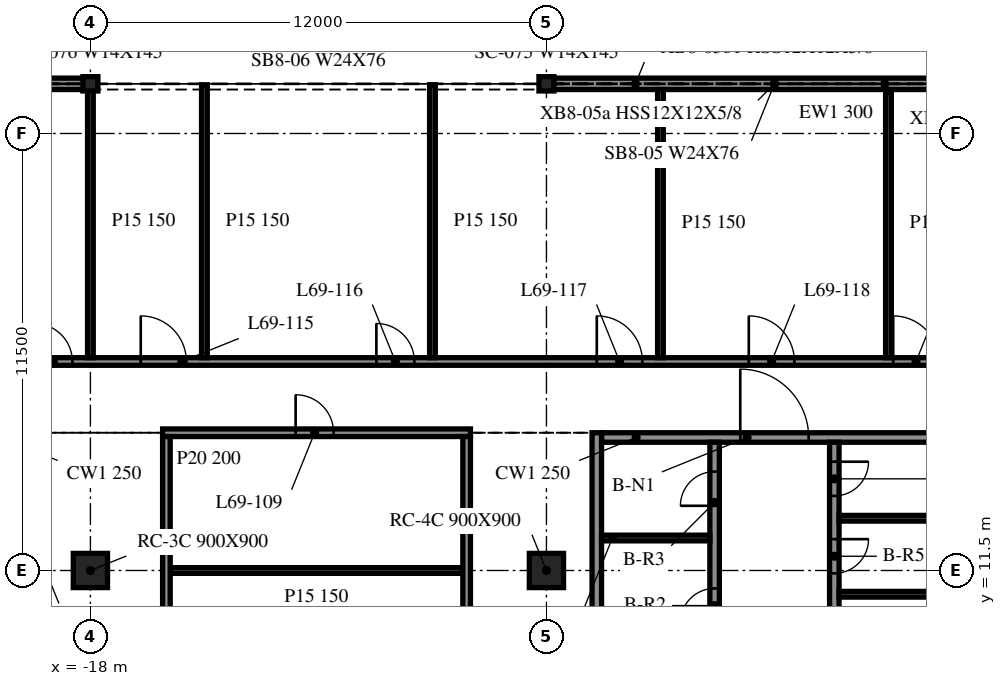
"""IFC4 building model, lengths in metres.
Left out: names, types, materials, properties, quantities, classifications, styles, units other than length and angle.
Written with IfcOpenShell. Run it as: python <this file> out.ifc"""

import sys

from ifc_helpers import new_model, si_unit, direction, frame, frame_2d, origin, origin_2d, place, context, subcontext, project, spatial, rectangle, i_section, extrude, element, fill, save


model = new_model("IFC4")
c1 = context("Model", 3, precision=1e-05, world=origin(), true_north=direction((0.0, 1.0)))
c2 = subcontext(c1, "Body", "Model", "MODEL_VIEW")
j1 = project(units=[si_unit("LENGTHUNIT", "METRE"), si_unit("PLANEANGLEUNIT", "RADIAN")], contexts=[c1])
p1 = place(None, origin())
s1 = spatial("IfcSite", under=j1, at=p1, CompositionType="ELEMENT")
p2 = place(p1, origin())
s2 = spatial("IfcBuilding", under=s1, at=p2, CompositionType="ELEMENT")
p3 = place(p2, frame((0.0, 0.0, 282.3)))
s3 = spatial("IfcBuildingStorey", under=s2, at=p3, CompositionType="ELEMENT", Elevation=282.3)
for number, where, z_axis, x_axis in (
    (1, (-18.0, 11.5, -0.34), (0.0, 0.0, 1.0), (1.0, 0.0, 0.0)),
    (2, (-6.0, 11.5, -0.34), (0.0, 0.0, 1.0), (1.0, 0.0, 0.0)),
):
    element("IfcColumn", number, at=place(p3, frame(where, z_axis=z_axis, x_axis=x_axis)), inside=s3, PredefinedType="COLUMN", context=c2, shape_type="SweptSolid", body=[
        extrude(rectangle(XDim=0.9, YDim=0.9, at=origin_2d()), origin(), (0.0, 0.0, 1.0), 7.34),
    ])
for number, where, z_axis, x_axis in (
    (3, (-6.0, 24.307, -0.34), (0.0, 0.0, 1.0), (1.0, 0.0, 0.0)),
    (4, (-18.0, 24.307, -0.34), (0.0, 0.0, 1.0), (1.0, 0.0, 0.0)),
):
    element("IfcColumn", number, at=place(p3, frame(where, z_axis=z_axis, x_axis=x_axis)), inside=s3, PredefinedType="COLUMN", context=c2, shape_type="SweptSolid", body=[
        extrude(i_section(OverallWidth=0.394, OverallDepth=0.376, WebThickness=0.017, FlangeThickness=0.028, at=origin_2d()), origin(), (0.0, 0.0, 1.0), 3.8),
    ])
for number, where, z_axis, x_axis in (
    (5, (5.991, 24.307, 0.0), (0.0, 0.0, 1.0), (-1.0, 0.0, 0.0)),
    (6, (-18.009, 24.307, 0.0), (0.0, 0.0, 1.0), (-1.0, 0.0, 0.0)),
):
    element("IfcWall", number, at=place(p3, frame(where, z_axis=z_axis, x_axis=x_axis)), inside=s3, PredefinedType="NOTDEFINED", context=c2, shape_type="SweptSolid", body=[
        extrude(rectangle(XDim=11.983, YDim=0.3, at=frame_2d((5.991, 0.0))), origin(), (0.0, 0.0, 1.0), 3.46),
    ])
p4 = place(p3, frame((-4.675, 15.125, 0.0), z_axis=(0.0, 0.0, 1.0), x_axis=(0.0, -1.0, 0.0)))
e7 = element("IfcWall", 7, at=p4, inside=s3, PredefinedType="SOLIDWALL", context=c2, shape_type="SweptSolid", body=[
    extrude(rectangle(XDim=24.25, YDim=0.25, at=frame_2d((12.125, 0.0))), origin(), (0.0, 0.0, 1.0), 3.46),
])
p5 = place(p3, frame((-4.55, 15.0, 0.0), z_axis=(0.0, 0.0, 1.0), x_axis=(1.0, 0.0, 0.0)))
e8 = element("IfcWall", 8, at=p5, inside=s3, PredefinedType="SOLIDWALL", context=c2, shape_type="SweptSolid", body=[
    extrude(rectangle(XDim=9.1, YDim=0.25, at=frame_2d((4.55, 0.0))), origin(), (0.0, 0.0, 1.0), 3.46),
])
p6 = place(p5, frame((3.65, 0.0, 0.0)))
e9 = element("IfcOpeningElement", 9, at=p6, cuts=e8, PredefinedType="OPENING", context=c2, shape_type="SweptSolid", body=[
    extrude(rectangle(XDim=1.8, YDim=2.1, at=frame_2d((0.9, 1.05))), frame((0.0, 0.135, 0.0), z_axis=(0.0, -1.0, 0.0), x_axis=(1.0, 0.0, 0.0)), (0.0, 0.0, 1.0), 0.27),
])
p7 = place(p3, frame((-1.575, -8.875, 0.0), z_axis=(0.0, 0.0, 1.0), x_axis=(0.0, 1.0, 0.0)))
e10 = element("IfcWall", 10, at=p7, inside=s3, PredefinedType="SOLIDWALL", context=c2, shape_type="SweptSolid", body=[
    extrude(rectangle(XDim=23.75, YDim=0.25, at=frame_2d((11.875, 0.0))), origin(), (0.0, 0.0, 1.0), 3.46),
])
p8 = place(p7, frame((7.2, 0.0, 0.0)))
e11 = element("IfcOpeningElement", 11, at=p8, cuts=e10, PredefinedType="OPENING", context=c2, shape_type="SweptSolid", body=[
    extrude(rectangle(XDim=1.1, YDim=2.1, at=frame_2d((0.55, 1.05))), frame((0.0, 0.135, 0.0), z_axis=(0.0, -1.0, 0.0), x_axis=(1.0, 0.0, 0.0)), (0.0, 0.0, 1.0), 0.27),
])
p9 = place(p7, frame((9.95, 0.0, 0.0)))
e12 = element("IfcOpeningElement", 12, at=p9, cuts=e10, PredefinedType="OPENING", context=c2, shape_type="SweptSolid", body=[
    extrude(rectangle(XDim=1.1, YDim=2.1, at=frame_2d((0.55, 1.05))), frame((0.0, 0.135, 0.0), z_axis=(0.0, -1.0, 0.0), x_axis=(1.0, 0.0, 0.0)), (0.0, 0.0, 1.0), 0.27),
])
p10 = place(p7, frame((12.7, 0.0, 0.0)))
e13 = element("IfcOpeningElement", 13, at=p10, cuts=e10, PredefinedType="OPENING", context=c2, shape_type="SweptSolid", body=[
    extrude(rectangle(XDim=1.1, YDim=2.1, at=frame_2d((0.55, 1.05))), frame((0.0, 0.135, 0.0), z_axis=(0.0, -1.0, 0.0), x_axis=(1.0, 0.0, 0.0)), (0.0, 0.0, 1.0), 0.27),
])
p11 = place(p7, frame((15.45, 0.0, 0.0)))
e14 = element("IfcOpeningElement", 14, at=p11, cuts=e10, PredefinedType="OPENING", context=c2, shape_type="SweptSolid", body=[
    extrude(rectangle(XDim=1.1, YDim=2.1, at=frame_2d((0.55, 1.05))), frame((0.0, 0.135, 0.0), z_axis=(0.0, -1.0, 0.0), x_axis=(1.0, 0.0, 0.0)), (0.0, 0.0, 1.0), 0.27),
])
p12 = place(p7, frame((2.55, 0.0, 0.0)))
e15 = element("IfcOpeningElement", 15, at=p12, cuts=e10, PredefinedType="OPENING", context=c2, shape_type="SweptSolid", body=[
    extrude(rectangle(XDim=0.9, YDim=2.1, at=frame_2d((0.45, 1.05))), frame((0.0, 0.135, 0.0), z_axis=(0.0, -1.0, 0.0), x_axis=(1.0, 0.0, 0.0)), (0.0, 0.0, 1.0), 0.27),
])
p13 = place(p7, frame((19.002, 0.0, 0.0)))
e16 = element("IfcOpeningElement", 16, at=p13, cuts=e10, PredefinedType="OPENING", context=c2, shape_type="SweptSolid", body=[
    extrude(rectangle(XDim=0.9, YDim=2.1, at=frame_2d((0.45, 1.05))), frame((0.0, 0.135, 0.0), z_axis=(0.0, -1.0, 0.0), x_axis=(1.0, 0.0, 0.0)), (0.0, 0.0, 1.0), 0.27),
])
p14 = place(p7, frame((22.077, 0.0, 0.0)))
e17 = element("IfcOpeningElement", 17, at=p14, cuts=e10, PredefinedType="OPENING", context=c2, shape_type="SweptSolid", body=[
    extrude(rectangle(XDim=0.9, YDim=2.1, at=frame_2d((0.45, 1.05))), frame((0.0, 0.135, 0.0), z_axis=(0.0, -1.0, 0.0), x_axis=(1.0, 0.0, 0.0)), (0.0, 0.0, 1.0), 0.27),
])
p15 = place(p3, frame((1.575, 14.875, 0.0), z_axis=(0.0, 0.0, 1.0), x_axis=(0.0, -1.0, 0.0)))
e18 = element("IfcWall", 18, at=p15, inside=s3, PredefinedType="SOLIDWALL", context=c2, shape_type="SweptSolid", body=[
    extrude(rectangle(XDim=17.5, YDim=0.25, at=frame_2d((8.75, 0.0))), origin(), (0.0, 0.0, 1.0), 3.46),
])
p16 = place(p15, frame((15.45, 0.0, 0.0)))
e19 = element("IfcOpeningElement", 19, at=p16, cuts=e18, PredefinedType="OPENING", context=c2, shape_type="SweptSolid", body=[
    extrude(rectangle(XDim=1.1, YDim=2.1, at=frame_2d((0.55, 1.05))), frame((0.0, 0.135, 0.0), z_axis=(0.0, -1.0, 0.0), x_axis=(1.0, 0.0, 0.0)), (0.0, 0.0, 1.0), 0.27),
])
p17 = place(p15, frame((12.7, 0.0, 0.0)))
e20 = element("IfcOpeningElement", 20, at=p17, cuts=e18, PredefinedType="OPENING", context=c2, shape_type="SweptSolid", body=[
    extrude(rectangle(XDim=1.1, YDim=2.1, at=frame_2d((0.55, 1.05))), frame((0.0, 0.135, 0.0), z_axis=(0.0, -1.0, 0.0), x_axis=(1.0, 0.0, 0.0)), (0.0, 0.0, 1.0), 0.27),
])
p18 = place(p15, frame((9.95, 0.0, 0.0)))
e21 = element("IfcOpeningElement", 21, at=p18, cuts=e18, PredefinedType="OPENING", context=c2, shape_type="SweptSolid", body=[
    extrude(rectangle(XDim=1.1, YDim=2.1, at=frame_2d((0.55, 1.05))), frame((0.0, 0.135, 0.0), z_axis=(0.0, -1.0, 0.0), x_axis=(1.0, 0.0, 0.0)), (0.0, 0.0, 1.0), 0.27),
])
p19 = place(p15, frame((7.2, 0.0, 0.0)))
e22 = element("IfcOpeningElement", 22, at=p19, cuts=e18, PredefinedType="OPENING", context=c2, shape_type="SweptSolid", body=[
    extrude(rectangle(XDim=1.1, YDim=2.1, at=frame_2d((0.55, 1.05))), frame((0.0, 0.135, 0.0), z_axis=(0.0, -1.0, 0.0), x_axis=(1.0, 0.0, 0.0)), (0.0, 0.0, 1.0), 0.27),
])
p20 = place(p15, frame((4.587, 0.0, 0.0)))
e23 = element("IfcOpeningElement", 23, at=p20, cuts=e18, PredefinedType="OPENING", context=c2, shape_type="SweptSolid", body=[
    extrude(rectangle(XDim=0.9, YDim=2.1, at=frame_2d((0.45, 1.05))), frame((0.0, 0.135, 0.0), z_axis=(0.0, -1.0, 0.0), x_axis=(1.0, 0.0, 0.0)), (0.0, 0.0, 1.0), 0.27),
])
p21 = place(p15, frame((2.55, 0.0, 0.0)))
e24 = element("IfcOpeningElement", 24, at=p21, cuts=e18, PredefinedType="OPENING", context=c2, shape_type="SweptSolid", body=[
    extrude(rectangle(XDim=0.9, YDim=2.1, at=frame_2d((0.45, 1.05))), frame((0.0, 0.135, 0.0), z_axis=(0.0, -1.0, 0.0), x_axis=(1.0, 0.0, 0.0)), (0.0, 0.0, 1.0), 0.27),
])
p22 = place(p15, frame((0.512, 0.0, 0.0)))
e25 = element("IfcOpeningElement", 25, at=p22, cuts=e18, PredefinedType="OPENING", context=c2, shape_type="SweptSolid", body=[
    extrude(rectangle(XDim=0.9, YDim=2.1, at=frame_2d((0.45, 1.05))), frame((0.0, 0.135, 0.0), z_axis=(0.0, -1.0, 0.0), x_axis=(1.0, 0.0, 0.0)), (0.0, 0.0, 1.0), 0.27),
])
for number, where, z_axis, x_axis in (
    (26, (-4.55, 12.355, 0.0), (0.0, 0.0, 1.0), (1.0, 0.0, 0.0)),
    (27, (1.7, 10.875, 0.0), (0.0, 0.0, 1.0), (1.0, 0.0, 0.0)),
    (28, (1.7, 12.875, 0.0), (0.0, 0.0, 1.0), (1.0, 0.0, 0.0)),
):
    element("IfcWall", number, at=place(p3, frame(where, z_axis=z_axis, x_axis=x_axis)), inside=s3, PredefinedType="PARTITIONING", context=c2, shape_type="SweptSolid", body=[
        extrude(rectangle(XDim=2.85, YDim=0.15, at=frame_2d((1.425, 0.0))), origin(), (0.0, 0.0, 1.0), 3.46),
    ])
p23 = place(p3, frame((-15.9, 11.5, 0.0), z_axis=(0.0, 0.0, 1.0), x_axis=(1.0, 0.0, 0.0)))
e29 = element("IfcWall", 29, at=p23, inside=s3, PredefinedType="PARTITIONING", context=c2, shape_type="SweptSolid", body=[
    extrude(rectangle(XDim=7.7, YDim=0.15, at=frame_2d((3.85, 0.0))), origin(), (0.0, 0.0, 1.0), 3.4),
])
p24 = place(p3, frame((-16.1, 15.125, 0.0), z_axis=(0.0, 0.0, 1.0), x_axis=(1.0, 0.0, 0.0)))
e30 = element("IfcWall", 30, at=p24, inside=s3, PredefinedType="PARTITIONING", context=c2, shape_type="SweptSolid", body=[
    extrude(rectangle(XDim=8.1, YDim=0.2, at=frame_2d((4.05, 0.0))), origin(), (0.0, 0.0, 1.0), 3.4),
])
p25 = place(p24, frame((3.5, 0.0, 0.0)))
e31 = element("IfcOpeningElement", 31, at=p25, cuts=e30, PredefinedType="OPENING", context=c2, shape_type="SweptSolid", body=[
    extrude(rectangle(XDim=1.0, YDim=2.1, at=frame_2d((0.5, 1.05))), frame((0.0, 0.11, 0.0), z_axis=(0.0, -1.0, 0.0), x_axis=(1.0, 0.0, 0.0)), (0.0, 0.0, 1.0), 0.22),
])
p26 = place(p3, frame((-47.975, 17.0, 0.0), z_axis=(0.0, 0.0, 1.0), x_axis=(1.0, 0.0, 0.0)))
e32 = element("IfcWall", 32, at=p26, inside=s3, PredefinedType="PARTITIONING", context=c2, shape_type="SweptSolid", body=[
    extrude(rectangle(XDim=95.95, YDim=0.2, at=frame_2d((47.975, 0.0))), origin(), (0.0, 0.0, 1.0), 3.4),
])
p27 = place(p26, frame((7.3, 0.0, 0.0)))
e33 = element("IfcOpeningElement", 33, at=p27, cuts=e32, PredefinedType="OPENING", context=c2, shape_type="SweptSolid", body=[
    extrude(rectangle(XDim=1.2, YDim=2.1, at=frame_2d((0.6, 1.05))), frame((0.0, 0.11, 0.0), z_axis=(0.0, -1.0, 0.0), x_axis=(1.0, 0.0, 0.0)), (0.0, 0.0, 1.0), 0.22),
])
p28 = place(p26, frame((13.3, 0.0, 0.0)))
e34 = element("IfcOpeningElement", 34, at=p28, cuts=e32, PredefinedType="OPENING", context=c2, shape_type="SweptSolid", body=[
    extrude(rectangle(XDim=1.2, YDim=2.1, at=frame_2d((0.6, 1.05))), frame((0.0, 0.11, 0.0), z_axis=(0.0, -1.0, 0.0), x_axis=(1.0, 0.0, 0.0)), (0.0, 0.0, 1.0), 0.22),
])
p29 = place(p26, frame((19.3, 0.0, 0.0)))
e35 = element("IfcOpeningElement", 35, at=p29, cuts=e32, PredefinedType="OPENING", context=c2, shape_type="SweptSolid", body=[
    extrude(rectangle(XDim=1.2, YDim=2.1, at=frame_2d((0.6, 1.05))), frame((0.0, 0.11, 0.0), z_axis=(0.0, -1.0, 0.0), x_axis=(1.0, 0.0, 0.0)), (0.0, 0.0, 1.0), 0.22),
])
p30 = place(p26, frame((28.5, 0.0, 0.0)))
e36 = element("IfcOpeningElement", 36, at=p30, cuts=e32, PredefinedType="OPENING", context=c2, shape_type="SweptSolid", body=[
    extrude(rectangle(XDim=1.0, YDim=2.1, at=frame_2d((0.5, 1.05))), frame((0.0, 0.11, 0.0), z_axis=(0.0, -1.0, 0.0), x_axis=(1.0, 0.0, 0.0)), (0.0, 0.0, 1.0), 0.22),
])
p31 = place(p26, frame((31.3, 0.0, 0.0)))
e37 = element("IfcOpeningElement", 37, at=p31, cuts=e32, PredefinedType="OPENING", context=c2, shape_type="SweptSolid", body=[
    extrude(rectangle(XDim=1.2, YDim=2.1, at=frame_2d((0.6, 1.05))), frame((0.0, 0.11, 0.0), z_axis=(0.0, -1.0, 0.0), x_axis=(1.0, 0.0, 0.0)), (0.0, 0.0, 1.0), 0.22),
])
p32 = place(p26, frame((37.5, 0.0, 0.0)))
e38 = element("IfcOpeningElement", 38, at=p32, cuts=e32, PredefinedType="OPENING", context=c2, shape_type="SweptSolid", body=[
    extrude(rectangle(XDim=1.0, YDim=2.1, at=frame_2d((0.5, 1.05))), frame((0.0, 0.11, 0.0), z_axis=(0.0, -1.0, 0.0), x_axis=(1.0, 0.0, 0.0)), (0.0, 0.0, 1.0), 0.22),
])
p33 = place(p26, frame((43.3, 0.0, 0.0)))
e39 = element("IfcOpeningElement", 39, at=p33, cuts=e32, PredefinedType="OPENING", context=c2, shape_type="SweptSolid", body=[
    extrude(rectangle(XDim=1.2, YDim=2.1, at=frame_2d((0.6, 1.05))), frame((0.0, 0.11, 0.0), z_axis=(0.0, -1.0, 0.0), x_axis=(1.0, 0.0, 0.0)), (0.0, 0.0, 1.0), 0.22),
])
p34 = place(p26, frame((47.3, 0.0, 0.0)))
e40 = element("IfcOpeningElement", 40, at=p34, cuts=e32, PredefinedType="OPENING", context=c2, shape_type="SweptSolid", body=[
    extrude(rectangle(XDim=1.2, YDim=2.1, at=frame_2d((0.6, 1.05))), frame((0.0, 0.11, 0.0), z_axis=(0.0, -1.0, 0.0), x_axis=(1.0, 0.0, 0.0)), (0.0, 0.0, 1.0), 0.22),
])
p35 = place(p26, frame((51.1, 0.0, 0.0)))
e41 = element("IfcOpeningElement", 41, at=p35, cuts=e32, PredefinedType="OPENING", context=c2, shape_type="SweptSolid", body=[
    extrude(rectangle(XDim=1.2, YDim=2.1, at=frame_2d((0.6, 1.05))), frame((0.0, 0.11, 0.0), z_axis=(0.0, -1.0, 0.0), x_axis=(1.0, 0.0, 0.0)), (0.0, 0.0, 1.0), 0.22),
])
p36 = place(p26, frame((60.1, 0.0, 0.0)))
e42 = element("IfcOpeningElement", 42, at=p36, cuts=e32, PredefinedType="OPENING", context=c2, shape_type="SweptSolid", body=[
    extrude(rectangle(XDim=1.0, YDim=2.1, at=frame_2d((0.5, 1.05))), frame((0.0, 0.11, 0.0), z_axis=(0.0, -1.0, 0.0), x_axis=(1.0, 0.0, 0.0)), (0.0, 0.0, 1.0), 0.22),
])
p37 = place(p26, frame((63.1, 0.0, 0.0)))
e43 = element("IfcOpeningElement", 43, at=p37, cuts=e32, PredefinedType="OPENING", context=c2, shape_type="SweptSolid", body=[
    extrude(rectangle(XDim=1.2, YDim=2.1, at=frame_2d((0.6, 1.05))), frame((0.0, 0.11, 0.0), z_axis=(0.0, -1.0, 0.0), x_axis=(1.0, 0.0, 0.0)), (0.0, 0.0, 1.0), 0.22),
])
p38 = place(p26, frame((69.1, 0.0, 0.0)))
e44 = element("IfcOpeningElement", 44, at=p38, cuts=e32, PredefinedType="OPENING", context=c2, shape_type="SweptSolid", body=[
    extrude(rectangle(XDim=1.0, YDim=2.1, at=frame_2d((0.5, 1.05))), frame((0.0, 0.11, 0.0), z_axis=(0.0, -1.0, 0.0), x_axis=(1.0, 0.0, 0.0)), (0.0, 0.0, 1.0), 0.22),
])
p39 = place(p26, frame((75.1, 0.0, 0.0)))
e45 = element("IfcOpeningElement", 45, at=p39, cuts=e32, PredefinedType="OPENING", context=c2, shape_type="SweptSolid", body=[
    extrude(rectangle(XDim=1.2, YDim=2.1, at=frame_2d((0.6, 1.05))), frame((0.0, 0.11, 0.0), z_axis=(0.0, -1.0, 0.0), x_axis=(1.0, 0.0, 0.0)), (0.0, 0.0, 1.0), 0.22),
])
p40 = place(p26, frame((81.1, 0.0, 0.0)))
e46 = element("IfcOpeningElement", 46, at=p40, cuts=e32, PredefinedType="OPENING", context=c2, shape_type="SweptSolid", body=[
    extrude(rectangle(XDim=1.2, YDim=2.1, at=frame_2d((0.6, 1.05))), frame((0.0, 0.11, 0.0), z_axis=(0.0, -1.0, 0.0), x_axis=(1.0, 0.0, 0.0)), (0.0, 0.0, 1.0), 0.22),
])
p41 = place(p26, frame((90.1, 0.0, 0.0)))
e47 = element("IfcOpeningElement", 47, at=p41, cuts=e32, PredefinedType="OPENING", context=c2, shape_type="SweptSolid", body=[
    extrude(rectangle(XDim=1.2, YDim=2.1, at=frame_2d((0.6, 1.05))), frame((0.0, 0.11, 0.0), z_axis=(0.0, -1.0, 0.0), x_axis=(1.0, 0.0, 0.0)), (0.0, 0.0, 1.0), 0.22),
])
p42 = place(p3, frame((-18.0, 17.1, 0.0), z_axis=(0.0, 0.0, 1.0), x_axis=(0.0, 1.0, 0.0)))
e48 = element("IfcWall", 48, at=p42, inside=s3, PredefinedType="PARTITIONING", context=c2, shape_type="SweptSolid", body=[
    extrude(rectangle(XDim=7.182, YDim=0.15, at=frame_2d((3.591, 0.0))), origin(), (0.0, 0.0, 1.0), 3.4),
])
p43 = place(p3, frame((-16.0, -9.025, 0.0), z_axis=(0.0, 0.0, 1.0), x_axis=(0.0, 1.0, 0.0)))
e49 = element("IfcWall", 49, at=p43, inside=s3, PredefinedType="PARTITIONING", context=c2, shape_type="SweptSolid", body=[
    extrude(rectangle(XDim=24.05, YDim=0.2, at=frame_2d((12.025, 0.0))), origin(), (0.0, 0.0, 1.0), 3.4),
])
p44 = place(p43, frame((11.5, 0.0, 0.0)))
e50 = element("IfcOpeningElement", 50, at=p44, cuts=e49, PredefinedType="OPENING", context=c2, shape_type="SweptSolid", body=[
    extrude(rectangle(XDim=0.9, YDim=2.1, at=frame_2d((0.45, 1.05))), frame((0.0, 0.11, 0.0), z_axis=(0.0, -1.0, 0.0), x_axis=(1.0, 0.0, 0.0)), (0.0, 0.0, 1.0), 0.22),
])
for number, where, z_axis, x_axis in (
    (51, (-15.0, 17.1, 0.0), (0.0, 0.0, 1.0), (0.0, 1.0, 0.0)),
    (52, (-9.0, 17.1, 0.0), (0.0, 0.0, 1.0), (0.0, 1.0, 0.0)),
):
    element("IfcWall", number, at=place(p3, frame(where, z_axis=z_axis, x_axis=x_axis)), inside=s3, PredefinedType="PARTITIONING", context=c2, shape_type="SweptSolid", body=[
        extrude(rectangle(XDim=7.182, YDim=0.15, at=frame_2d((3.591, 0.0))), origin(), (0.0, 0.0, 1.0), 3.4),
    ])
p45 = place(p3, frame((-8.1, -9.025, 0.0), z_axis=(0.0, 0.0, 1.0), x_axis=(0.0, 1.0, 0.0)))
e53 = element("IfcWall", 53, at=p45, inside=s3, PredefinedType="PARTITIONING", context=c2, shape_type="SweptSolid", body=[
    extrude(rectangle(XDim=24.05, YDim=0.2, at=frame_2d((12.025, 0.0))), origin(), (0.0, 0.0, 1.0), 3.4),
])
for number, where, z_axis, x_axis in (
    (54, (-3.0, 17.1, 0.0), (0.0, 0.0, 1.0), (0.0, 1.0, 0.0)),
    (55, (3.0, 17.1, 0.0), (0.0, 0.0, 1.0), (0.0, 1.0, 0.0)),
):
    element("IfcWall", number, at=place(p3, frame(where, z_axis=z_axis, x_axis=x_axis)), inside=s3, PredefinedType="PARTITIONING", context=c2, shape_type="SweptSolid", body=[
        extrude(rectangle(XDim=7.057, YDim=0.15, at=frame_2d((3.528, 0.0))), origin(), (0.0, 0.0, 1.0), 3.4),
    ])
p46 = place(p6, origin())
e56 = element("IfcDoor", 56, at=p46, inside=s3, OperationType="DOUBLE_DOOR_SINGLE_SWING", PredefinedType="DOOR", context=c2, shape_type="SweptSolid", body=[
    extrude(rectangle(XDim=1.8, YDim=2.1, at=frame_2d((0.9, 1.05))), frame((0.0, 0.025, 0.0), z_axis=(0.0, -1.0, 0.0), x_axis=(1.0, 0.0, 0.0)), (0.0, 0.0, 1.0), 0.05),
])
fill(e9, e56)
p47 = place(p13, origin())
e57 = element("IfcDoor", 57, at=p47, inside=s3, OperationType="SINGLE_SWING_RIGHT", PredefinedType="DOOR", context=c2, shape_type="SweptSolid", body=[
    extrude(rectangle(XDim=0.9, YDim=2.1, at=frame_2d((0.45, 1.05))), frame((0.0, 0.025, 0.0), z_axis=(0.0, -1.0, 0.0), x_axis=(1.0, 0.0, 0.0)), (0.0, 0.0, 1.0), 0.05),
])
fill(e16, e57)
p48 = place(p14, origin())
e58 = element("IfcDoor", 58, at=p48, inside=s3, OperationType="SINGLE_SWING_LEFT", PredefinedType="DOOR", context=c2, shape_type="SweptSolid", body=[
    extrude(rectangle(XDim=0.9, YDim=2.1, at=frame_2d((0.45, 1.05))), frame((0.0, 0.025, 0.0), z_axis=(0.0, -1.0, 0.0), x_axis=(1.0, 0.0, 0.0)), (0.0, 0.0, 1.0), 0.05),
])
fill(e17, e58)
p49 = place(p21, origin())
e59 = element("IfcDoor", 59, at=p49, inside=s3, OperationType="SINGLE_SWING_LEFT", PredefinedType="DOOR", context=c2, shape_type="SweptSolid", body=[
    extrude(rectangle(XDim=0.9, YDim=2.1, at=frame_2d((0.45, 1.05))), frame((0.0, 0.025, 0.0), z_axis=(0.0, -1.0, 0.0), x_axis=(1.0, 0.0, 0.0)), (0.0, 0.0, 1.0), 0.05),
])
fill(e24, e59)
p50 = place(p22, origin())
e60 = element("IfcDoor", 60, at=p50, inside=s3, OperationType="SINGLE_SWING_RIGHT", PredefinedType="DOOR", context=c2, shape_type="SweptSolid", body=[
    extrude(rectangle(XDim=0.9, YDim=2.1, at=frame_2d((0.45, 1.05))), frame((0.0, 0.025, 0.0), z_axis=(0.0, -1.0, 0.0), x_axis=(1.0, 0.0, 0.0)), (0.0, 0.0, 1.0), 0.05),
])
fill(e25, e60)
p51 = place(p25, origin())
e61 = element("IfcDoor", 61, at=p51, inside=s3, OperationType="SINGLE_SWING_RIGHT", PredefinedType="DOOR", context=c2, shape_type="SweptSolid", body=[
    extrude(rectangle(XDim=1.0, YDim=2.1, at=frame_2d((0.5, 1.05))), frame((0.0, 0.025, 0.0), z_axis=(0.0, -1.0, 0.0), x_axis=(1.0, 0.0, 0.0)), (0.0, 0.0, 1.0), 0.05),
])
fill(e31, e61)
p52 = place(p30, origin())
e62 = element("IfcDoor", 62, at=p52, inside=s3, OperationType="SINGLE_SWING_LEFT", PredefinedType="DOOR", context=c2, shape_type="SweptSolid", body=[
    extrude(rectangle(XDim=1.0, YDim=2.1, at=frame_2d((0.5, 1.05))), frame((0.0, 0.025, 0.0), z_axis=(0.0, -1.0, 0.0), x_axis=(1.0, 0.0, 0.0)), (0.0, 0.0, 1.0), 0.05),
])
fill(e36, e62)
p53 = place(p31, origin())
e63 = element("IfcDoor", 63, at=p53, inside=s3, OperationType="SINGLE_SWING_LEFT", PredefinedType="DOOR", context=c2, shape_type="SweptSolid", body=[
    extrude(rectangle(XDim=1.2, YDim=2.1, at=frame_2d((0.6, 1.05))), frame((0.0, 0.025, 0.0), z_axis=(0.0, -1.0, 0.0), x_axis=(1.0, 0.0, 0.0)), (0.0, 0.0, 1.0), 0.05),
])
fill(e37, e63)
p54 = place(p32, origin())
e64 = element("IfcDoor", 64, at=p54, inside=s3, OperationType="SINGLE_SWING_LEFT", PredefinedType="DOOR", context=c2, shape_type="SweptSolid", body=[
    extrude(rectangle(XDim=1.0, YDim=2.1, at=frame_2d((0.5, 1.05))), frame((0.0, 0.025, 0.0), z_axis=(0.0, -1.0, 0.0), x_axis=(1.0, 0.0, 0.0)), (0.0, 0.0, 1.0), 0.05),
])
fill(e38, e64)
p55 = place(p33, origin())
e65 = element("IfcDoor", 65, at=p55, inside=s3, OperationType="SINGLE_SWING_LEFT", PredefinedType="DOOR", context=c2, shape_type="SweptSolid", body=[
    extrude(rectangle(XDim=1.2, YDim=2.1, at=frame_2d((0.6, 1.05))), frame((0.0, 0.025, 0.0), z_axis=(0.0, -1.0, 0.0), x_axis=(1.0, 0.0, 0.0)), (0.0, 0.0, 1.0), 0.05),
])
fill(e39, e65)
p56 = place(p34, origin())
e66 = element("IfcDoor", 66, at=p56, inside=s3, OperationType="SINGLE_SWING_RIGHT", PredefinedType="DOOR", context=c2, shape_type="SweptSolid", body=[
    extrude(rectangle(XDim=1.2, YDim=2.1, at=frame_2d((0.6, 1.05))), frame((0.0, 0.025, 0.0), z_axis=(0.0, -1.0, 0.0), x_axis=(1.0, 0.0, 0.0)), (0.0, 0.0, 1.0), 0.05),
])
fill(e40, e66)
p57 = place(p35, origin())
e67 = element("IfcDoor", 67, at=p57, inside=s3, OperationType="SINGLE_SWING_RIGHT", PredefinedType="DOOR", context=c2, shape_type="SweptSolid", body=[
    extrude(rectangle(XDim=1.2, YDim=2.1, at=frame_2d((0.6, 1.05))), frame((0.0, 0.025, 0.0), z_axis=(0.0, -1.0, 0.0), x_axis=(1.0, 0.0, 0.0)), (0.0, 0.0, 1.0), 0.05),
])
fill(e41, e67)
save(model, sys.argv[1])
